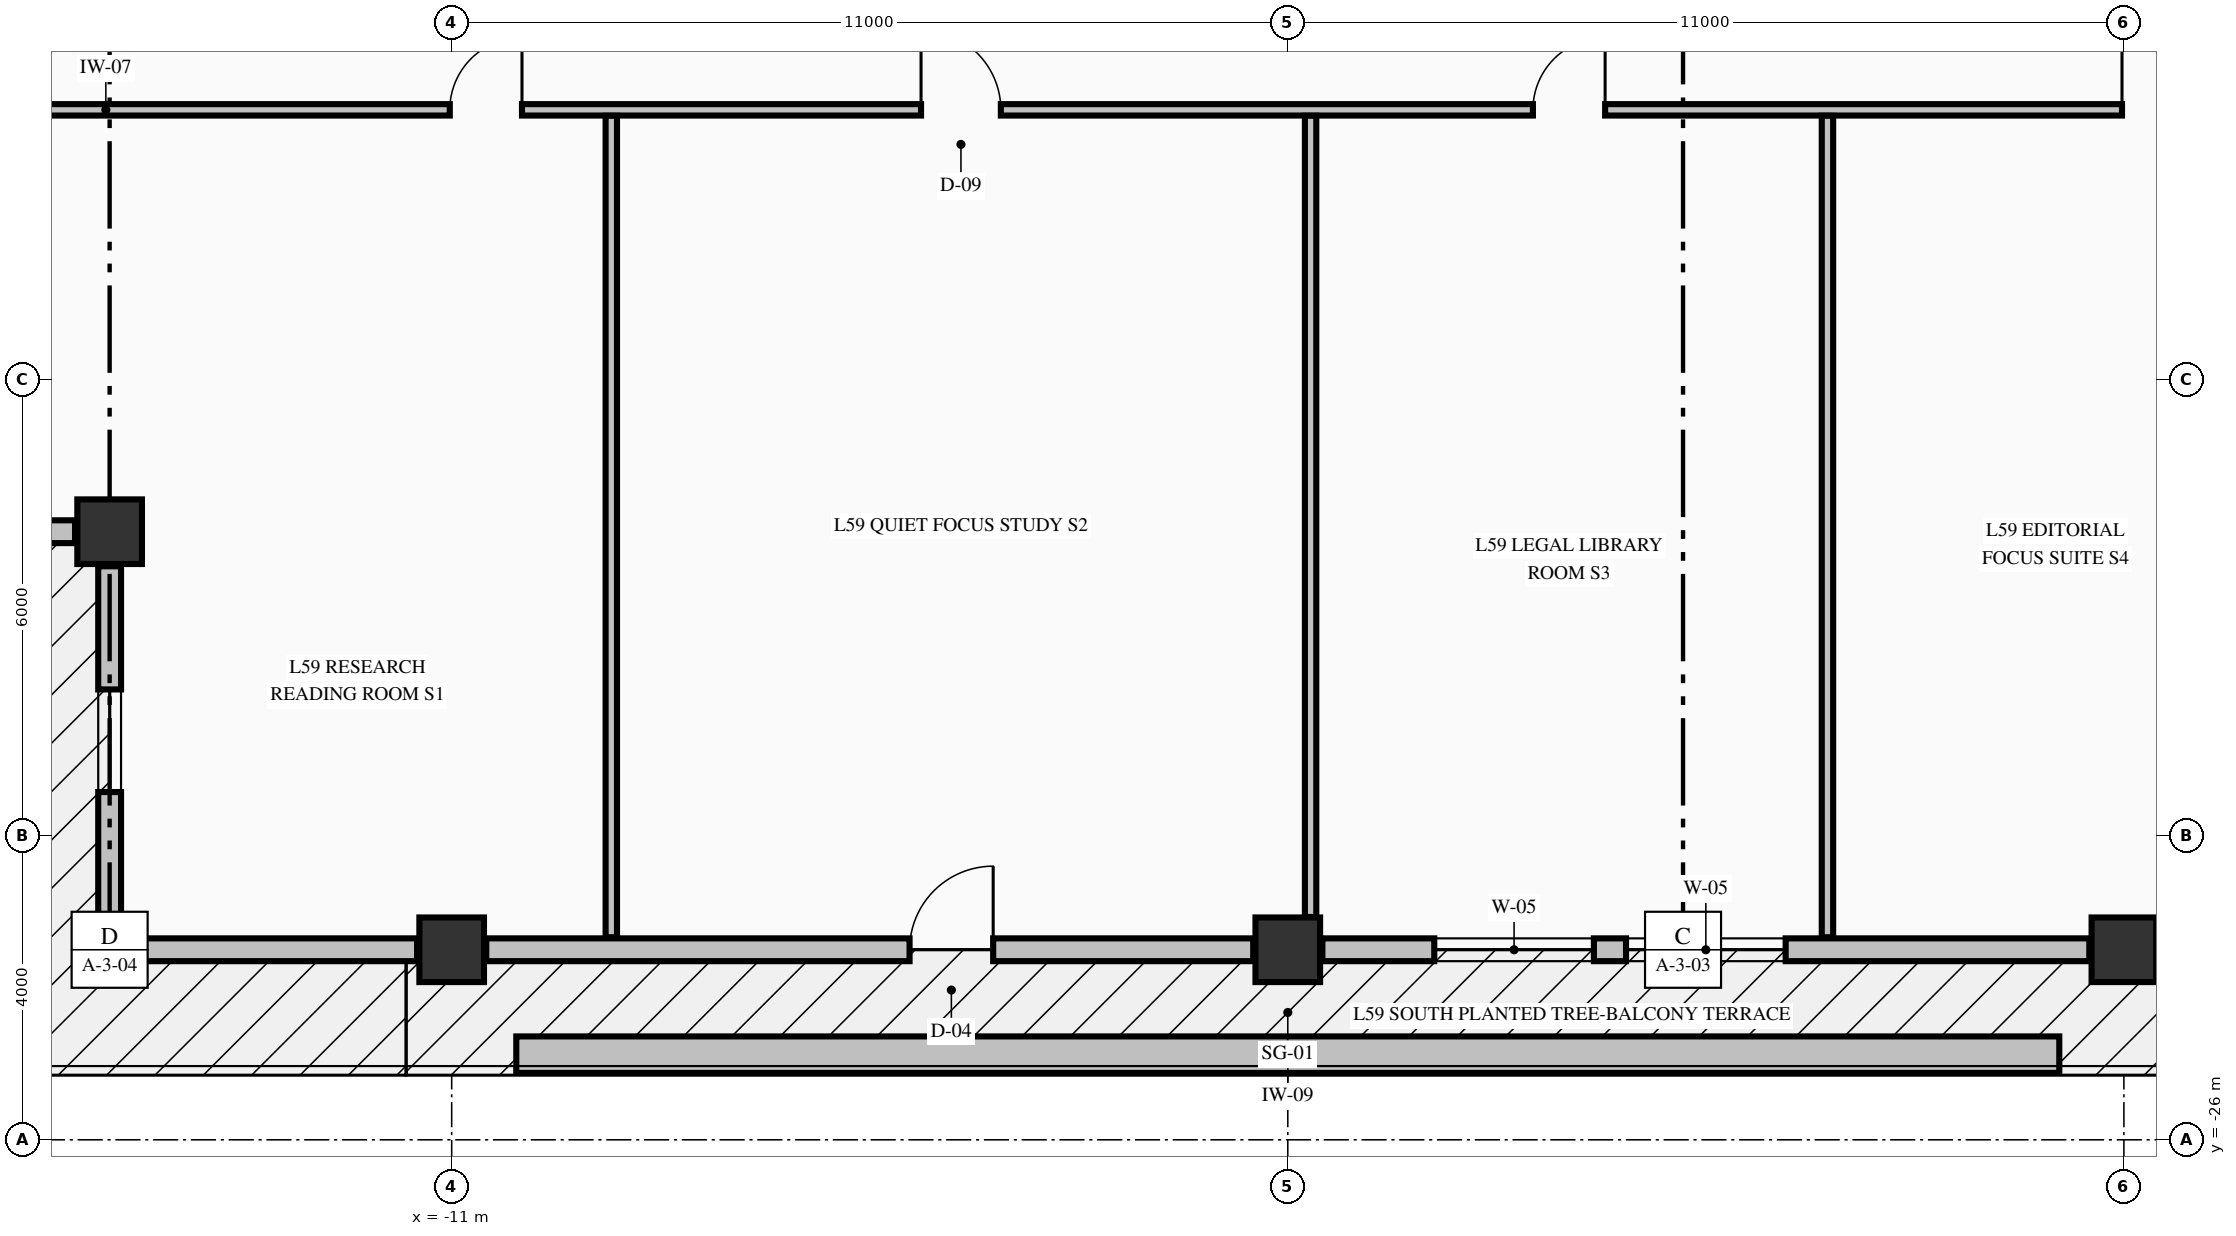
"""IFC4 building model, lengths in metres.
Left out: names, types, materials, properties, quantities, classifications, styles, units other than length and angle.
Written with IfcOpenShell. Run it as: python <this file> out.ifc"""

import sys

from ifc_helpers import new_model, si_unit, direction, frame, frame_2d, origin, origin_2d, place, context, subcontext, project, spatial, rectangle, extrude, element, fill, save


model = new_model("IFC4")
c1 = context("Model", 3, precision=1e-05, world=origin(), true_north=direction((0.0, 1.0)))
c2 = subcontext(c1, "Body", "Model", "MODEL_VIEW")
j1 = project(units=[si_unit("LENGTHUNIT", "METRE"), si_unit("PLANEANGLEUNIT", "RADIAN")], contexts=[c1])
p1 = place(None, origin())
s1 = spatial("IfcSite", under=j1, at=p1, CompositionType="ELEMENT")
p2 = place(p1, origin())
s2 = spatial("IfcBuilding", under=s1, at=p2, CompositionType="ELEMENT")
p3 = place(p2, frame((0.0, 0.0, 226.82)))
s3 = spatial("IfcBuildingStorey", under=s2, at=p3, CompositionType="ELEMENT", Elevation=226.82)
for number, where, z_axis, x_axis in (
    (1, (-15.5, -23.5, -0.425), (0.0, 0.0, 1.0), (1.0, 0.0, 0.0)),
    (2, (-11.0, -23.5, -0.425), (0.0, 0.0, 1.0), (1.0, 0.0, 0.0)),
    (3, (0.0, -23.5, -0.425), (0.0, 0.0, 1.0), (1.0, 0.0, 0.0)),
    (4, (11.0, -23.5, -0.425), (0.0, 0.0, 1.0), (1.0, 0.0, 0.0)),
    (5, (-15.5, -18.0, -0.425), (0.0, 0.0, 1.0), (1.0, 0.0, 0.0)),
):
    element("IfcColumn", number, at=place(p3, frame(where, z_axis=z_axis, x_axis=x_axis)), inside=s3, PredefinedType="COLUMN", context=c2, shape_type="SweptSolid", body=[
        extrude(rectangle(XDim=0.85, YDim=0.85, at=origin_2d()), origin(), (0.0, 0.0, 1.0), 3.405),
    ])
p4 = place(p3, frame((-20.545, -18.0, 0.0), z_axis=(0.0, 0.0, 1.0), x_axis=(1.0, 0.0, 0.0)))
e6 = element("IfcWall", 6, at=p4, inside=s3, PredefinedType="STANDARD", context=c2, shape_type="SweptSolid", body=[
    extrude(rectangle(XDim=4.59, YDim=0.3, at=frame_2d((2.295, 0.0))), origin(), (0.0, 0.0, 1.0), 2.372),
])
p5 = place(p4, frame((1.62, 0.0, 0.68)))
e7 = element("IfcOpeningElement", 7, at=p5, cuts=e6, PredefinedType="OPENING", context=c2, shape_type="SweptSolid", body=[
    extrude(rectangle(XDim=1.35, YDim=1.42, at=frame_2d((0.675, 0.71))), frame((0.0, 0.16, 0.0), z_axis=(0.0, -1.0, 0.0), x_axis=(1.0, 0.0, 0.0)), (0.0, 0.0, 1.0), 0.32),
])
p6 = place(p3, frame((-15.5, -18.455, 0.0), z_axis=(0.0, 0.0, 1.0), x_axis=(0.0, -1.0, 0.0)))
e8 = element("IfcWall", 8, at=p6, inside=s3, PredefinedType="STANDARD", context=c2, shape_type="SweptSolid", body=[
    extrude(rectangle(XDim=4.59, YDim=0.3, at=frame_2d((2.295, 0.0))), origin(), (0.0, 0.0, 1.0), 2.372),
])
p7 = place(p6, frame((1.62, 0.0, 0.68)))
e9 = element("IfcOpeningElement", 9, at=p7, cuts=e8, PredefinedType="OPENING", context=c2, shape_type="SweptSolid", body=[
    extrude(rectangle(XDim=1.35, YDim=1.42, at=frame_2d((0.675, 0.71))), frame((0.0, 0.16, 0.0), z_axis=(0.0, -1.0, 0.0), x_axis=(1.0, 0.0, 0.0)), (0.0, 0.0, 1.0), 0.32),
])
p8 = place(p3, frame((-15.045, -23.5, 0.0), z_axis=(0.0, 0.0, 1.0), x_axis=(1.0, 0.0, 0.0)))
e10 = element("IfcWall", 10, at=p8, inside=s3, PredefinedType="STANDARD", context=c2, shape_type="SweptSolid", body=[
    extrude(rectangle(XDim=3.59, YDim=0.3, at=frame_2d((1.795, 0.0))), origin(), (0.0, 0.0, 1.0), 2.372),
])
p9 = place(p3, frame((-10.545, -23.5, 0.0), z_axis=(0.0, 0.0, 1.0), x_axis=(1.0, 0.0, 0.0)))
e11 = element("IfcWall", 11, at=p9, inside=s3, PredefinedType="STANDARD", context=c2, shape_type="SweptSolid", body=[
    extrude(rectangle(XDim=10.09, YDim=0.3, at=frame_2d((5.045, 0.0))), origin(), (0.0, 0.0, 1.0), 2.372),
])
p10 = place(p9, frame((5.569, 0.0, 0.0)))
e12 = element("IfcOpeningElement", 12, at=p10, cuts=e11, PredefinedType="OPENING", context=c2, shape_type="SweptSolid", body=[
    extrude(rectangle(XDim=1.1, YDim=2.15, at=frame_2d((0.55, 1.075))), frame((0.0, 0.16, 0.0), z_axis=(0.0, -1.0, 0.0), x_axis=(1.0, 0.0, 0.0)), (0.0, 0.0, 1.0), 0.32),
])
p11 = place(p3, frame((0.455, -23.5, 0.0), z_axis=(0.0, 0.0, 1.0), x_axis=(1.0, 0.0, 0.0)))
e13 = element("IfcWall", 13, at=p11, inside=s3, PredefinedType="STANDARD", context=c2, shape_type="SweptSolid", body=[
    extrude(rectangle(XDim=10.09, YDim=0.3, at=frame_2d((5.045, 0.0))), origin(), (0.0, 0.0, 1.0), 2.372),
])
p12 = place(p11, frame((1.472, 0.0, 0.7)))
e14 = element("IfcOpeningElement", 14, at=p12, cuts=e13, PredefinedType="OPENING", context=c2, shape_type="SweptSolid", body=[
    extrude(rectangle(XDim=2.1, YDim=1.5, at=frame_2d((1.05, 0.75))), frame((0.0, 0.16, 0.0), z_axis=(0.0, -1.0, 0.0), x_axis=(1.0, 0.0, 0.0)), (0.0, 0.0, 1.0), 0.32),
])
p13 = place(p11, frame((3.995, 0.0, 0.7)))
e15 = element("IfcOpeningElement", 15, at=p13, cuts=e13, PredefinedType="OPENING", context=c2, shape_type="SweptSolid", body=[
    extrude(rectangle(XDim=2.1, YDim=1.5, at=frame_2d((1.05, 0.75))), frame((0.0, 0.16, 0.0), z_axis=(0.0, -1.0, 0.0), x_axis=(1.0, 0.0, 0.0)), (0.0, 0.0, 1.0), 0.32),
])
p14 = place(p3, frame((-20.075, -12.45, 0.0), z_axis=(0.0, 0.0, 1.0), x_axis=(1.0, 0.0, 0.0)))
e16 = element("IfcWall", 16, at=p14, inside=s3, PredefinedType="PARTITIONING", context=c2, shape_type="SweptSolid", body=[
    extrude(rectangle(XDim=45.91, YDim=0.15, at=frame_2d((22.955, 0.0))), origin(), (0.0, 0.0, 1.0), 2.98),
])
p15 = place(p14, frame((9.05, 0.0, 0.0)))
e17 = element("IfcOpeningElement", 17, at=p15, cuts=e16, PredefinedType="OPENING", context=c2, shape_type="SweptSolid", body=[
    extrude(rectangle(XDim=0.95, YDim=2.15, at=frame_2d((0.475, 1.075))), frame((0.0, 0.085, 0.0), z_axis=(0.0, -1.0, 0.0), x_axis=(1.0, 0.0, 0.0)), (0.0, 0.0, 1.0), 0.17),
])
p16 = place(p14, frame((15.25, 0.0, 0.0)))
e18 = element("IfcOpeningElement", 18, at=p16, cuts=e16, PredefinedType="OPENING", context=c2, shape_type="SweptSolid", body=[
    extrude(rectangle(XDim=1.05, YDim=2.15, at=frame_2d((0.525, 1.075))), frame((0.0, 0.085, 0.0), z_axis=(0.0, -1.0, 0.0), x_axis=(1.0, 0.0, 0.0)), (0.0, 0.0, 1.0), 0.17),
])
p17 = place(p14, frame((23.3, 0.0, 0.0)))
e19 = element("IfcOpeningElement", 19, at=p17, cuts=e16, PredefinedType="OPENING", context=c2, shape_type="SweptSolid", body=[
    extrude(rectangle(XDim=0.95, YDim=2.15, at=frame_2d((0.475, 1.075))), frame((0.0, 0.085, 0.0), z_axis=(0.0, -1.0, 0.0), x_axis=(1.0, 0.0, 0.0)), (0.0, 0.0, 1.0), 0.17),
])
p18 = place(p14, frame((31.05, 0.0, 0.0)))
e20 = element("IfcOpeningElement", 20, at=p18, cuts=e16, PredefinedType="OPENING", context=c2, shape_type="SweptSolid", body=[
    extrude(rectangle(XDim=0.95, YDim=2.15, at=frame_2d((0.475, 1.075))), frame((0.0, 0.085, 0.0), z_axis=(0.0, -1.0, 0.0), x_axis=(1.0, 0.0, 0.0)), (0.0, 0.0, 1.0), 0.17),
])
p19 = place(p14, frame((36.05, 0.0, 0.0)))
e21 = element("IfcOpeningElement", 21, at=p19, cuts=e16, PredefinedType="OPENING", context=c2, shape_type="SweptSolid", body=[
    extrude(rectangle(XDim=0.95, YDim=2.15, at=frame_2d((0.475, 1.075))), frame((0.0, 0.085, 0.0), z_axis=(0.0, -1.0, 0.0), x_axis=(1.0, 0.0, 0.0)), (0.0, 0.0, 1.0), 0.17),
])
p20 = place(p3, frame((-8.9, -23.335, 0.0), z_axis=(0.0, 0.0, 1.0), x_axis=(0.0, 1.0, 0.0)))
e22 = element("IfcWall", 22, at=p20, inside=s3, PredefinedType="PARTITIONING", context=c2, shape_type="SweptSolid", body=[
    extrude(rectangle(XDim=10.807, YDim=0.15, at=frame_2d((5.403, 0.0))), origin(), (0.0, 0.0, 1.0), 2.98),
])
p21 = place(p3, frame((0.3, -23.069, 0.0), z_axis=(0.0, 0.0, 1.0), x_axis=(0.0, 1.0, 0.0)))
e23 = element("IfcWall", 23, at=p21, inside=s3, PredefinedType="PARTITIONING", context=c2, shape_type="SweptSolid", body=[
    extrude(rectangle(XDim=10.541, YDim=0.15, at=frame_2d((5.271, 0.0))), origin(), (0.0, 0.0, 1.0), 2.395),
])
p22 = place(p3, frame((7.1, -23.335, 0.0), z_axis=(0.0, 0.0, 1.0), x_axis=(0.0, 1.0, 0.0)))
e24 = element("IfcWall", 24, at=p22, inside=s3, PredefinedType="PARTITIONING", context=c2, shape_type="SweptSolid", body=[
    extrude(rectangle(XDim=10.807, YDim=0.15, at=frame_2d((5.403, 0.0))), origin(), (0.0, 0.0, 1.0), 2.98),
])
p23 = place(p3, frame((-10.15, -24.88, -0.04), z_axis=(0.0, 0.0, 1.0), x_axis=(1.0, 0.0, 0.0)))
e25 = element("IfcWall", 25, at=p23, inside=s3, PredefinedType="PARAPET", context=c2, shape_type="SweptSolid", body=[
    extrude(rectangle(XDim=20.3, YDim=0.48, at=frame_2d((10.15, 0.0))), origin(), (0.0, 0.0, 1.0), 0.52),
])
p24 = place(p7, origin())
e26 = element("IfcWindow", 26, at=p24, inside=s3, PartitioningType="SINGLE_PANEL", PredefinedType="WINDOW", context=c2, shape_type="SweptSolid", body=[
    extrude(rectangle(XDim=1.35, YDim=1.42, at=frame_2d((0.675, 0.71))), frame((0.0, 0.03, 0.0), z_axis=(0.0, -1.0, 0.0), x_axis=(1.0, 0.0, 0.0)), (0.0, 0.0, 1.0), 0.06),
])
fill(e9, e26)
p25 = place(p10, origin())
e27 = element("IfcDoor", 27, at=p25, inside=s3, OperationType="SINGLE_SWING_RIGHT", PredefinedType="DOOR", context=c2, shape_type="SweptSolid", body=[
    extrude(rectangle(XDim=1.1, YDim=2.15, at=frame_2d((0.55, 1.075))), frame((0.0, 0.025, 0.0), z_axis=(0.0, -1.0, 0.0), x_axis=(1.0, 0.0, 0.0)), (0.0, 0.0, 1.0), 0.05),
])
fill(e12, e27)
p26 = place(p12, origin())
e28 = element("IfcWindow", 28, at=p26, inside=s3, PartitioningType="SINGLE_PANEL", PredefinedType="WINDOW", context=c2, shape_type="SweptSolid", body=[
    extrude(rectangle(XDim=2.1, YDim=1.5, at=frame_2d((1.05, 0.75))), frame((0.0, 0.03, 0.0), z_axis=(0.0, -1.0, 0.0), x_axis=(1.0, 0.0, 0.0)), (0.0, 0.0, 1.0), 0.06),
])
fill(e14, e28)
p27 = place(p13, origin())
e29 = element("IfcWindow", 29, at=p27, inside=s3, PartitioningType="SINGLE_PANEL", PredefinedType="WINDOW", context=c2, shape_type="SweptSolid", body=[
    extrude(rectangle(XDim=2.1, YDim=1.5, at=frame_2d((1.05, 0.75))), frame((0.0, 0.03, 0.0), z_axis=(0.0, -1.0, 0.0), x_axis=(1.0, 0.0, 0.0)), (0.0, 0.0, 1.0), 0.06),
])
fill(e15, e29)
p28 = place(p15, origin())
e30 = element("IfcDoor", 30, at=p28, inside=s3, OperationType="SINGLE_SWING_RIGHT", PredefinedType="DOOR", context=c2, shape_type="SweptSolid", body=[
    extrude(rectangle(XDim=0.95, YDim=2.15, at=frame_2d((0.475, 1.075))), frame((0.0, 0.025, 0.0), z_axis=(0.0, -1.0, 0.0), x_axis=(1.0, 0.0, 0.0)), (0.0, 0.0, 1.0), 0.05),
])
fill(e17, e30)
p29 = place(p16, origin())
e31 = element("IfcDoor", 31, at=p29, inside=s3, OperationType="SINGLE_SWING_LEFT", PredefinedType="DOOR", context=c2, shape_type="SweptSolid", body=[
    extrude(rectangle(XDim=1.05, YDim=2.15, at=frame_2d((0.525, 1.075))), frame((0.0, 0.025, 0.0), z_axis=(0.0, -1.0, 0.0), x_axis=(1.0, 0.0, 0.0)), (0.0, 0.0, 1.0), 0.05),
])
fill(e18, e31)
p30 = place(p17, origin())
e32 = element("IfcDoor", 32, at=p30, inside=s3, OperationType="SINGLE_SWING_RIGHT", PredefinedType="DOOR", context=c2, shape_type="SweptSolid", body=[
    extrude(rectangle(XDim=0.95, YDim=2.15, at=frame_2d((0.475, 1.075))), frame((0.0, 0.025, 0.0), z_axis=(0.0, -1.0, 0.0), x_axis=(1.0, 0.0, 0.0)), (0.0, 0.0, 1.0), 0.05),
])
fill(e19, e32)
p31 = place(p18, origin())
e33 = element("IfcDoor", 33, at=p31, inside=s3, OperationType="SINGLE_SWING_LEFT", PredefinedType="DOOR", context=c2, shape_type="SweptSolid", body=[
    extrude(rectangle(XDim=0.95, YDim=2.15, at=frame_2d((0.475, 1.075))), frame((0.0, 0.025, 0.0), z_axis=(0.0, -1.0, 0.0), x_axis=(1.0, 0.0, 0.0)), (0.0, 0.0, 1.0), 0.05),
])
fill(e20, e33)
save(model, sys.argv[1])
